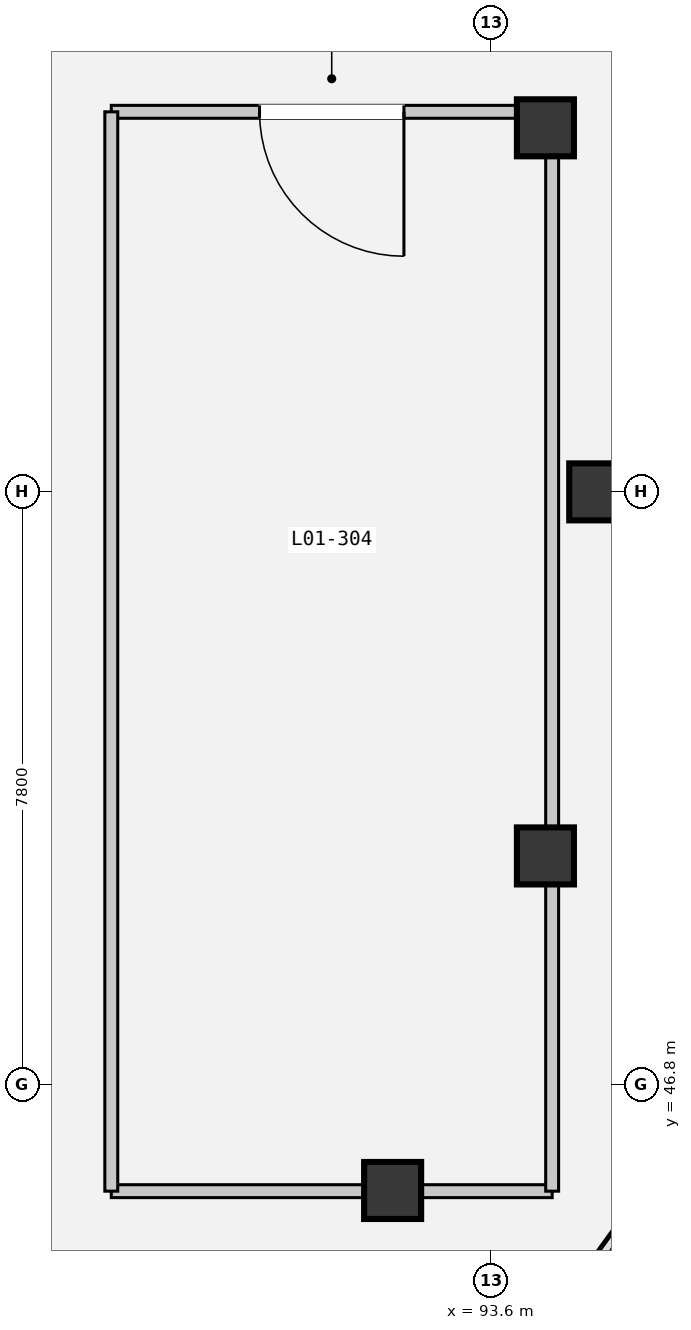
"""IFC4 building model, lengths in metres.
Left out: names, types, materials, properties, quantities, classifications, styles, units other than length and angle.
Written with IfcOpenShell. Run it as: python <this file> out.ifc"""

import sys

from ifc_helpers import new_model, si_unit, direction, frame, frame_2d, origin, origin_2d, place, context, subcontext, project, spatial, rectangle, circle, extrude, element, fill, save


model = new_model("IFC4")
c1 = context("Model", 3, precision=1e-05, world=origin(), true_north=direction((0.0, 1.0)))
c2 = subcontext(c1, "Body", "Model", "MODEL_VIEW")
j1 = project(units=[si_unit("LENGTHUNIT", "METRE"), si_unit("PLANEANGLEUNIT", "RADIAN")], contexts=[c1])
p1 = place(None, origin())
s1 = spatial("IfcSite", under=j1, at=p1, CompositionType="ELEMENT")
p2 = place(p1, origin())
s2 = spatial("IfcBuilding", under=s1, at=p2, CompositionType="ELEMENT")
p3 = place(p2, frame((0.0, 0.0, 5.4)))
s3 = spatial("IfcBuildingStorey", under=s2, at=p3, CompositionType="ELEMENT", Elevation=5.4)
for number, where, z_axis, x_axis in (
    (1, (95.0, 54.6, 0.0), (0.0, 0.0, 1.0), (1.0, 0.0, 0.0)),
    (2, (94.311, 59.389, 0.0), (0.0, 0.0, 1.0), (1.0, 0.0, 0.0)),
    (3, (92.301, 45.409, 0.0), (0.0, 0.0, 1.0), (1.0, 0.0, 0.0)),
    (4, (94.311, 49.811, 0.0), (0.0, 0.0, 1.0), (1.0, 0.0, 0.0)),
):
    element("IfcColumn", number, at=place(p3, frame(where, z_axis=z_axis, x_axis=x_axis)), inside=s3, PredefinedType="COLUMN", context=c2, shape_type="SweptSolid", body=[
        extrude(circle(Radius=0.375, at=origin_2d()), origin(), (0.0, 0.0, 1.0), 4.8),
    ])
p4 = place(p3, frame((93.458, 42.259, 0.0), z_axis=(0.0, 0.0, 1.0), x_axis=(0.584727530692, 0.811229754663, 0.0)))
e5 = element("IfcWall", 5, at=p4, inside=s3, PredefinedType="SOLIDWALL", context=c2, shape_type="SweptSolid", body=[
    extrude(rectangle(XDim=4.289, YDim=0.26, at=frame_2d((2.145, 0.0))), origin(), (0.0, 0.0, 1.0), 1.02),
])
p5 = place(p3, frame((88.6, 45.4, 0.0), z_axis=(0.0, 0.0, 1.0), x_axis=(1.0, 0.0, 0.0)))
e6 = element("IfcWall", 6, at=p5, inside=s3, PredefinedType="PARTITIONING", context=c2, shape_type="SweptSolid", body=[
    extrude(rectangle(XDim=5.8, YDim=0.17, at=frame_2d((2.9, 0.0))), origin(), (0.0, 0.0, 1.0), 3.45),
])
p6 = place(p3, frame((94.4, 45.4, 0.0), z_axis=(0.0, 0.0, 1.0), x_axis=(0.0, 1.0, 0.0)))
e7 = element("IfcWall", 7, at=p6, inside=s3, PredefinedType="PARTITIONING", context=c2, shape_type="SweptSolid", body=[
    extrude(rectangle(XDim=14.2, YDim=0.17, at=frame_2d((7.1, 0.0))), origin(), (0.0, 0.0, 1.0), 3.45),
])
p7 = place(p3, frame((94.4, 59.6, 0.0), z_axis=(0.0, 0.0, 1.0), x_axis=(-1.0, 0.0, 0.0)))
e8 = element("IfcWall", 8, at=p7, inside=s3, PredefinedType="PARTITIONING", context=c2, shape_type="SweptSolid", body=[
    extrude(rectangle(XDim=5.8, YDim=0.17, at=frame_2d((2.9, 0.0))), origin(), (0.0, 0.0, 1.0), 3.45),
])
p8 = place(p7, frame((1.95, 0.0, 0.0)))
e9 = element("IfcOpeningElement", 9, at=p8, cuts=e8, PredefinedType="OPENING", context=c2, shape_type="SweptSolid", body=[
    extrude(rectangle(XDim=1.9, YDim=2.45, at=frame_2d((0.95, 1.225))), frame((0.0, 0.095, 0.0), z_axis=(0.0, -1.0, 0.0), x_axis=(1.0, 0.0, 0.0)), (0.0, 0.0, 1.0), 0.19),
])
p9 = place(p3, frame((88.6, 59.6, 0.0), z_axis=(0.0, 0.0, 1.0), x_axis=(0.0, -1.0, 0.0)))
e10 = element("IfcWall", 10, at=p9, inside=s3, PredefinedType="PARTITIONING", context=c2, shape_type="SweptSolid", body=[
    extrude(rectangle(XDim=14.2, YDim=0.17, at=frame_2d((7.1, 0.0))), origin(), (0.0, 0.0, 1.0), 3.45),
])
p10 = place(p8, origin())
e11 = element("IfcDoor", 11, at=p10, inside=s3, OperationType="DOUBLE_DOOR_SINGLE_SWING", PredefinedType="DOOR", context=c2, shape_type="SweptSolid", body=[
    extrude(rectangle(XDim=1.9, YDim=2.45, at=frame_2d((0.95, 1.225))), frame((0.0, 0.025, 0.0), z_axis=(0.0, -1.0, 0.0), x_axis=(1.0, 0.0, 0.0)), (0.0, 0.0, 1.0), 0.05),
])
fill(e9, e11)
save(model, sys.argv[1])
